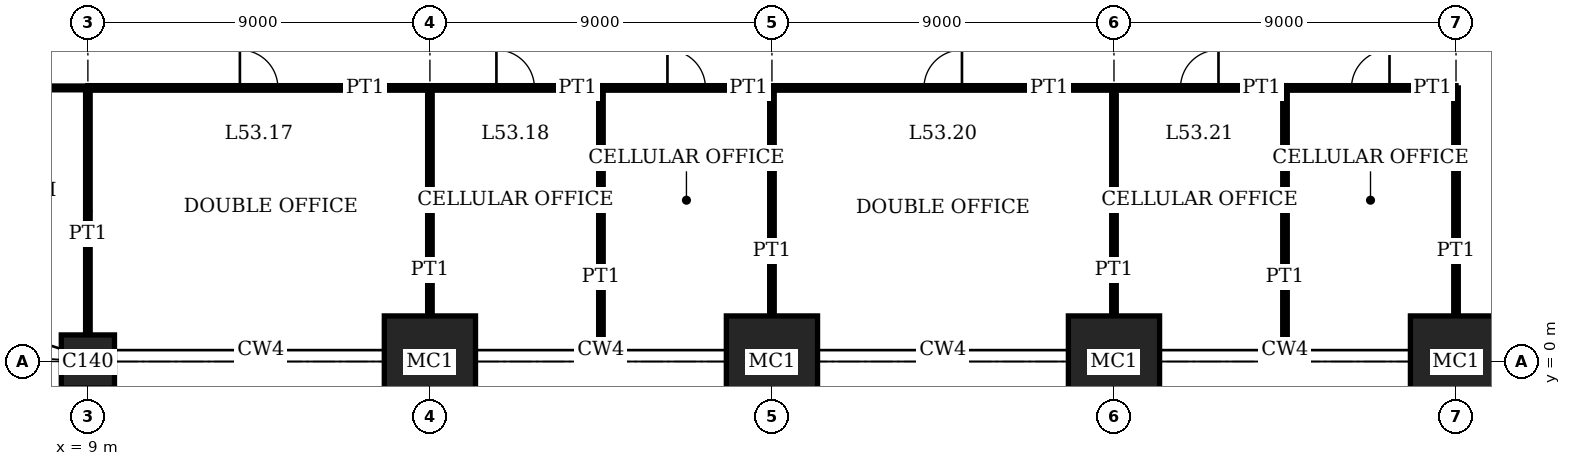
"""IFC4 building model, lengths in metres.
Left out: names, types, materials, properties, quantities, classifications, styles, units other than length and angle.
Written with IfcOpenShell. Run it as: python <this file> out.ifc"""

import sys

from ifc_helpers import new_model, si_unit, direction, frame, frame_2d, origin, origin_2d, place, context, subcontext, project, spatial, rectangle, extrude, element, fill, save


model = new_model("IFC4")
c1 = context("Model", 3, precision=1e-05, world=origin(), true_north=direction((0.0, 1.0)))
c2 = subcontext(c1, "Body", "Model", "MODEL_VIEW")
j1 = project(units=[si_unit("LENGTHUNIT", "METRE"), si_unit("PLANEANGLEUNIT", "RADIAN")], contexts=[c1])
p1 = place(None, origin())
s1 = spatial("IfcSite", under=j1, at=p1, CompositionType="ELEMENT")
p2 = place(p1, origin())
s2 = spatial("IfcBuilding", under=s1, at=p2, CompositionType="ELEMENT")
p3 = place(p2, frame((0.0, 0.0, 218.2)))
s3 = spatial("IfcBuildingStorey", under=s2, at=p3, CompositionType="ELEMENT", Elevation=218.2)
p4 = place(p3, frame((9.0, 0.0, 0.0), z_axis=(0.0, 0.0, 1.0), x_axis=(1.0, 0.0, 0.0)))
e1 = element("IfcColumn", 1, at=p4, inside=s3, PredefinedType="COLUMN", context=c2, shape_type="SweptSolid", body=[
    extrude(rectangle(XDim=1.4, YDim=1.4, at=origin_2d()), origin(), (0.0, 0.0, 1.0), 4.0),
])
for number, where, z_axis, x_axis in (
    (2, (18.0, 0.0, 0.0), (0.0, 0.0, 1.0), (1.0, 0.0, 0.0)),
    (3, (27.0, 0.0, 0.0), (0.0, 0.0, 1.0), (1.0, 0.0, 0.0)),
    (4, (36.0, 0.0, 0.0), (0.0, 0.0, 1.0), (1.0, 0.0, 0.0)),
    (5, (45.0, 0.0, 0.0), (0.0, 0.0, 1.0), (1.0, 0.0, 0.0)),
):
    element("IfcColumn", number, at=place(p3, frame(where, z_axis=z_axis, x_axis=x_axis)), inside=s3, PredefinedType="COLUMN", context=c2, shape_type="SweptSolid", body=[
        extrude(rectangle(XDim=2.4, YDim=2.4, at=origin_2d()), origin(), (0.0, 0.0, 1.0), 4.0),
    ])
p5 = place(p3, frame((9.0, 7.2, 0.0), z_axis=(0.0, 0.0, 1.0), x_axis=(1.0, 0.0, 0.0)))
e6 = element("IfcWall", 6, at=p5, inside=s3, PredefinedType="PARTITIONING", context=c2, shape_type="SweptSolid", body=[
    extrude(rectangle(XDim=9.0, YDim=0.12, at=frame_2d((4.5, 0.0))), origin(), (0.0, 0.0, 1.0), 3.75),
])
p6 = place(p5, frame((4.0, 0.0, 0.0)))
e7 = element("IfcOpeningElement", 7, at=p6, cuts=e6, PredefinedType="OPENING", context=c2, shape_type="SweptSolid", body=[
    extrude(rectangle(XDim=1.0, YDim=2.4, at=frame_2d((0.5, 1.2))), frame((0.0, 0.07, 0.0), z_axis=(0.0, -1.0, 0.0), x_axis=(1.0, 0.0, 0.0)), (0.0, 0.0, 1.0), 0.14),
])
p7 = place(p3, frame((18.0, 7.2, 0.0), z_axis=(0.0, 0.0, 1.0), x_axis=(1.0, 0.0, 0.0)))
e8 = element("IfcWall", 8, at=p7, inside=s3, PredefinedType="PARTITIONING", context=c2, shape_type="SweptSolid", body=[
    extrude(rectangle(XDim=4.5, YDim=0.12, at=frame_2d((2.25, 0.0))), origin(), (0.0, 0.0, 1.0), 3.75),
])
p8 = place(p7, frame((1.75, 0.0, 0.0)))
e9 = element("IfcOpeningElement", 9, at=p8, cuts=e8, PredefinedType="OPENING", context=c2, shape_type="SweptSolid", body=[
    extrude(rectangle(XDim=1.0, YDim=2.4, at=frame_2d((0.5, 1.2))), frame((0.0, 0.07, 0.0), z_axis=(0.0, -1.0, 0.0), x_axis=(1.0, 0.0, 0.0)), (0.0, 0.0, 1.0), 0.14),
])
p9 = place(p3, frame((22.5, 7.2, 0.0), z_axis=(0.0, 0.0, 1.0), x_axis=(1.0, 0.0, 0.0)))
e10 = element("IfcWall", 10, at=p9, inside=s3, PredefinedType="PARTITIONING", context=c2, shape_type="SweptSolid", body=[
    extrude(rectangle(XDim=4.5, YDim=0.12, at=frame_2d((2.25, 0.0))), origin(), (0.0, 0.0, 1.0), 3.75),
])
p10 = place(p9, frame((1.75, 0.0, 0.0)))
e11 = element("IfcOpeningElement", 11, at=p10, cuts=e10, PredefinedType="OPENING", context=c2, shape_type="SweptSolid", body=[
    extrude(rectangle(XDim=1.0, YDim=2.4, at=frame_2d((0.5, 1.2))), frame((0.0, 0.07, 0.0), z_axis=(0.0, -1.0, 0.0), x_axis=(1.0, 0.0, 0.0)), (0.0, 0.0, 1.0), 0.14),
])
p11 = place(p3, frame((27.0, 7.2, 0.0), z_axis=(0.0, 0.0, 1.0), x_axis=(1.0, 0.0, 0.0)))
e12 = element("IfcWall", 12, at=p11, inside=s3, PredefinedType="PARTITIONING", context=c2, shape_type="SweptSolid", body=[
    extrude(rectangle(XDim=9.0, YDim=0.12, at=frame_2d((4.5, 0.0))), origin(), (0.0, 0.0, 1.0), 3.75),
])
p12 = place(p11, frame((4.0, 0.0, 0.0)))
e13 = element("IfcOpeningElement", 13, at=p12, cuts=e12, PredefinedType="OPENING", context=c2, shape_type="SweptSolid", body=[
    extrude(rectangle(XDim=1.0, YDim=2.4, at=frame_2d((0.5, 1.2))), frame((0.0, 0.07, 0.0), z_axis=(0.0, -1.0, 0.0), x_axis=(1.0, 0.0, 0.0)), (0.0, 0.0, 1.0), 0.14),
])
p13 = place(p3, frame((36.0, 7.2, 0.0), z_axis=(0.0, 0.0, 1.0), x_axis=(1.0, 0.0, 0.0)))
e14 = element("IfcWall", 14, at=p13, inside=s3, PredefinedType="PARTITIONING", context=c2, shape_type="SweptSolid", body=[
    extrude(rectangle(XDim=4.5, YDim=0.12, at=frame_2d((2.25, 0.0))), origin(), (0.0, 0.0, 1.0), 3.75),
])
p14 = place(p13, frame((1.75, 0.0, 0.0)))
e15 = element("IfcOpeningElement", 15, at=p14, cuts=e14, PredefinedType="OPENING", context=c2, shape_type="SweptSolid", body=[
    extrude(rectangle(XDim=1.0, YDim=2.4, at=frame_2d((0.5, 1.2))), frame((0.0, 0.07, 0.0), z_axis=(0.0, -1.0, 0.0), x_axis=(1.0, 0.0, 0.0)), (0.0, 0.0, 1.0), 0.14),
])
p15 = place(p3, frame((40.5, 7.2, 0.0), z_axis=(0.0, 0.0, 1.0), x_axis=(1.0, 0.0, 0.0)))
e16 = element("IfcWall", 16, at=p15, inside=s3, PredefinedType="PARTITIONING", context=c2, shape_type="SweptSolid", body=[
    extrude(rectangle(XDim=4.5, YDim=0.12, at=frame_2d((2.25, 0.0))), origin(), (0.0, 0.0, 1.0), 3.75),
])
p16 = place(p15, frame((1.75, 0.0, 0.0)))
e17 = element("IfcOpeningElement", 17, at=p16, cuts=e16, PredefinedType="OPENING", context=c2, shape_type="SweptSolid", body=[
    extrude(rectangle(XDim=1.0, YDim=2.4, at=frame_2d((0.5, 1.2))), frame((0.0, 0.07, 0.0), z_axis=(0.0, -1.0, 0.0), x_axis=(1.0, 0.0, 0.0)), (0.0, 0.0, 1.0), 0.14),
])
p17 = place(p3, frame((0.72, 7.2, 0.0), z_axis=(0.0, 0.0, 1.0), x_axis=(1.0, 0.0, 0.0)))
e18 = element("IfcWall", 18, at=p17, inside=s3, PredefinedType="PARTITIONING", context=c2, shape_type="SweptSolid", body=[
    extrude(rectangle(XDim=8.28, YDim=0.1, at=frame_2d((4.14, 0.0))), origin(), (0.0, 0.0, 1.0), 3.75),
])
p18 = place(p17, frame((2.78, 0.0, 0.0)))
e19 = element("IfcOpeningElement", 19, at=p18, cuts=e18, PredefinedType="OPENING", context=c2, shape_type="SweptSolid", body=[
    extrude(rectangle(XDim=1.0, YDim=2.4, at=frame_2d((0.5, 1.2))), frame((0.0, 0.06, 0.0), z_axis=(0.0, -1.0, 0.0), x_axis=(1.0, 0.0, 0.0)), (0.0, 0.0, 1.0), 0.12),
])
p19 = place(p3, frame((9.0, 0.7, 0.0), z_axis=(0.0, 0.0, 1.0), x_axis=(0.0, 1.0, 0.0)))
e20 = element("IfcWall", 20, at=p19, inside=s3, PredefinedType="PARTITIONING", context=c2, shape_type="SweptSolid", body=[
    extrude(rectangle(XDim=6.5, YDim=0.12, at=frame_2d((3.25, 0.0))), origin(), (0.0, 0.0, 1.0), 3.05),
])
p20 = place(p3, frame((18.0, 1.2, 0.0), z_axis=(0.0, 0.0, 1.0), x_axis=(0.0, 1.0, 0.0)))
e21 = element("IfcWall", 21, at=p20, inside=s3, PredefinedType="PARTITIONING", context=c2, shape_type="SweptSolid", body=[
    extrude(rectangle(XDim=6.0, YDim=0.12, at=frame_2d((3.0, 0.0))), origin(), (0.0, 0.0, 1.0), 3.05),
])
p21 = place(p3, frame((22.5, 0.31, 0.0), z_axis=(0.0, 0.0, 1.0), x_axis=(0.0, 1.0, 0.0)))
e22 = element("IfcWall", 22, at=p21, inside=s3, PredefinedType="PARTITIONING", context=c2, shape_type="SweptSolid", body=[
    extrude(rectangle(XDim=6.89, YDim=0.12, at=frame_2d((3.445, 0.0))), origin(), (0.0, 0.0, 1.0), 3.75),
])
for number, where, z_axis, x_axis in (
    (23, (27.0, 1.2, 0.0), (0.0, 0.0, 1.0), (0.0, 1.0, 0.0)),
    (24, (36.0, 1.2, 0.0), (0.0, 0.0, 1.0), (0.0, 1.0, 0.0)),
):
    element("IfcWall", number, at=place(p3, frame(where, z_axis=z_axis, x_axis=x_axis)), inside=s3, PredefinedType="PARTITIONING", context=c2, shape_type="SweptSolid", body=[
        extrude(rectangle(XDim=6.0, YDim=0.12, at=frame_2d((3.0, 0.0))), origin(), (0.0, 0.0, 1.0), 3.05),
    ])
p22 = place(p3, frame((40.5, 0.31, 0.0), z_axis=(0.0, 0.0, 1.0), x_axis=(0.0, 1.0, 0.0)))
e25 = element("IfcWall", 25, at=p22, inside=s3, PredefinedType="PARTITIONING", context=c2, shape_type="SweptSolid", body=[
    extrude(rectangle(XDim=6.89, YDim=0.12, at=frame_2d((3.445, 0.0))), origin(), (0.0, 0.0, 1.0), 3.75),
])
p23 = place(p3, frame((45.0, 1.2, 0.0), z_axis=(0.0, 0.0, 1.0), x_axis=(0.0, 1.0, 0.0)))
e26 = element("IfcWall", 26, at=p23, inside=s3, PredefinedType="PARTITIONING", context=c2, shape_type="SweptSolid", body=[
    extrude(rectangle(XDim=6.0, YDim=0.12, at=frame_2d((3.0, 0.0))), origin(), (0.0, 0.0, 1.0), 3.05),
])
p24 = place(p6, origin())
e27 = element("IfcDoor", 27, at=p24, inside=s3, OperationType="SINGLE_SWING_RIGHT", PredefinedType="DOOR", context=c2, shape_type="SweptSolid", body=[
    extrude(rectangle(XDim=1.0, YDim=2.4, at=frame_2d((0.5, 1.2))), frame((0.0, 0.025, 0.0), z_axis=(0.0, -1.0, 0.0), x_axis=(1.0, 0.0, 0.0)), (0.0, 0.0, 1.0), 0.05),
])
fill(e7, e27)
p25 = place(p8, origin())
e28 = element("IfcDoor", 28, at=p25, inside=s3, OperationType="SINGLE_SWING_RIGHT", PredefinedType="DOOR", context=c2, shape_type="SweptSolid", body=[
    extrude(rectangle(XDim=1.0, YDim=2.4, at=frame_2d((0.5, 1.2))), frame((0.0, 0.025, 0.0), z_axis=(0.0, -1.0, 0.0), x_axis=(1.0, 0.0, 0.0)), (0.0, 0.0, 1.0), 0.05),
])
fill(e9, e28)
p26 = place(p10, origin())
e29 = element("IfcDoor", 29, at=p26, inside=s3, OperationType="SINGLE_SWING_RIGHT", PredefinedType="DOOR", context=c2, shape_type="SweptSolid", body=[
    extrude(rectangle(XDim=1.0, YDim=2.4, at=frame_2d((0.5, 1.2))), frame((0.0, 0.025, 0.0), z_axis=(0.0, -1.0, 0.0), x_axis=(1.0, 0.0, 0.0)), (0.0, 0.0, 1.0), 0.05),
])
fill(e11, e29)
p27 = place(p12, origin())
e30 = element("IfcDoor", 30, at=p27, inside=s3, OperationType="SINGLE_SWING_LEFT", PredefinedType="DOOR", context=c2, shape_type="SweptSolid", body=[
    extrude(rectangle(XDim=1.0, YDim=2.4, at=frame_2d((0.5, 1.2))), frame((0.0, 0.025, 0.0), z_axis=(0.0, -1.0, 0.0), x_axis=(1.0, 0.0, 0.0)), (0.0, 0.0, 1.0), 0.05),
])
fill(e13, e30)
p28 = place(p14, origin())
e31 = element("IfcDoor", 31, at=p28, inside=s3, OperationType="SINGLE_SWING_LEFT", PredefinedType="DOOR", context=c2, shape_type="SweptSolid", body=[
    extrude(rectangle(XDim=1.0, YDim=2.4, at=frame_2d((0.5, 1.2))), frame((0.0, 0.025, 0.0), z_axis=(0.0, -1.0, 0.0), x_axis=(1.0, 0.0, 0.0)), (0.0, 0.0, 1.0), 0.05),
])
fill(e15, e31)
p29 = place(p16, origin())
e32 = element("IfcDoor", 32, at=p29, inside=s3, OperationType="SINGLE_SWING_LEFT", PredefinedType="DOOR", context=c2, shape_type="SweptSolid", body=[
    extrude(rectangle(XDim=1.0, YDim=2.4, at=frame_2d((0.5, 1.2))), frame((0.0, 0.025, 0.0), z_axis=(0.0, -1.0, 0.0), x_axis=(1.0, 0.0, 0.0)), (0.0, 0.0, 1.0), 0.05),
])
fill(e17, e32)
save(model, sys.argv[1])
